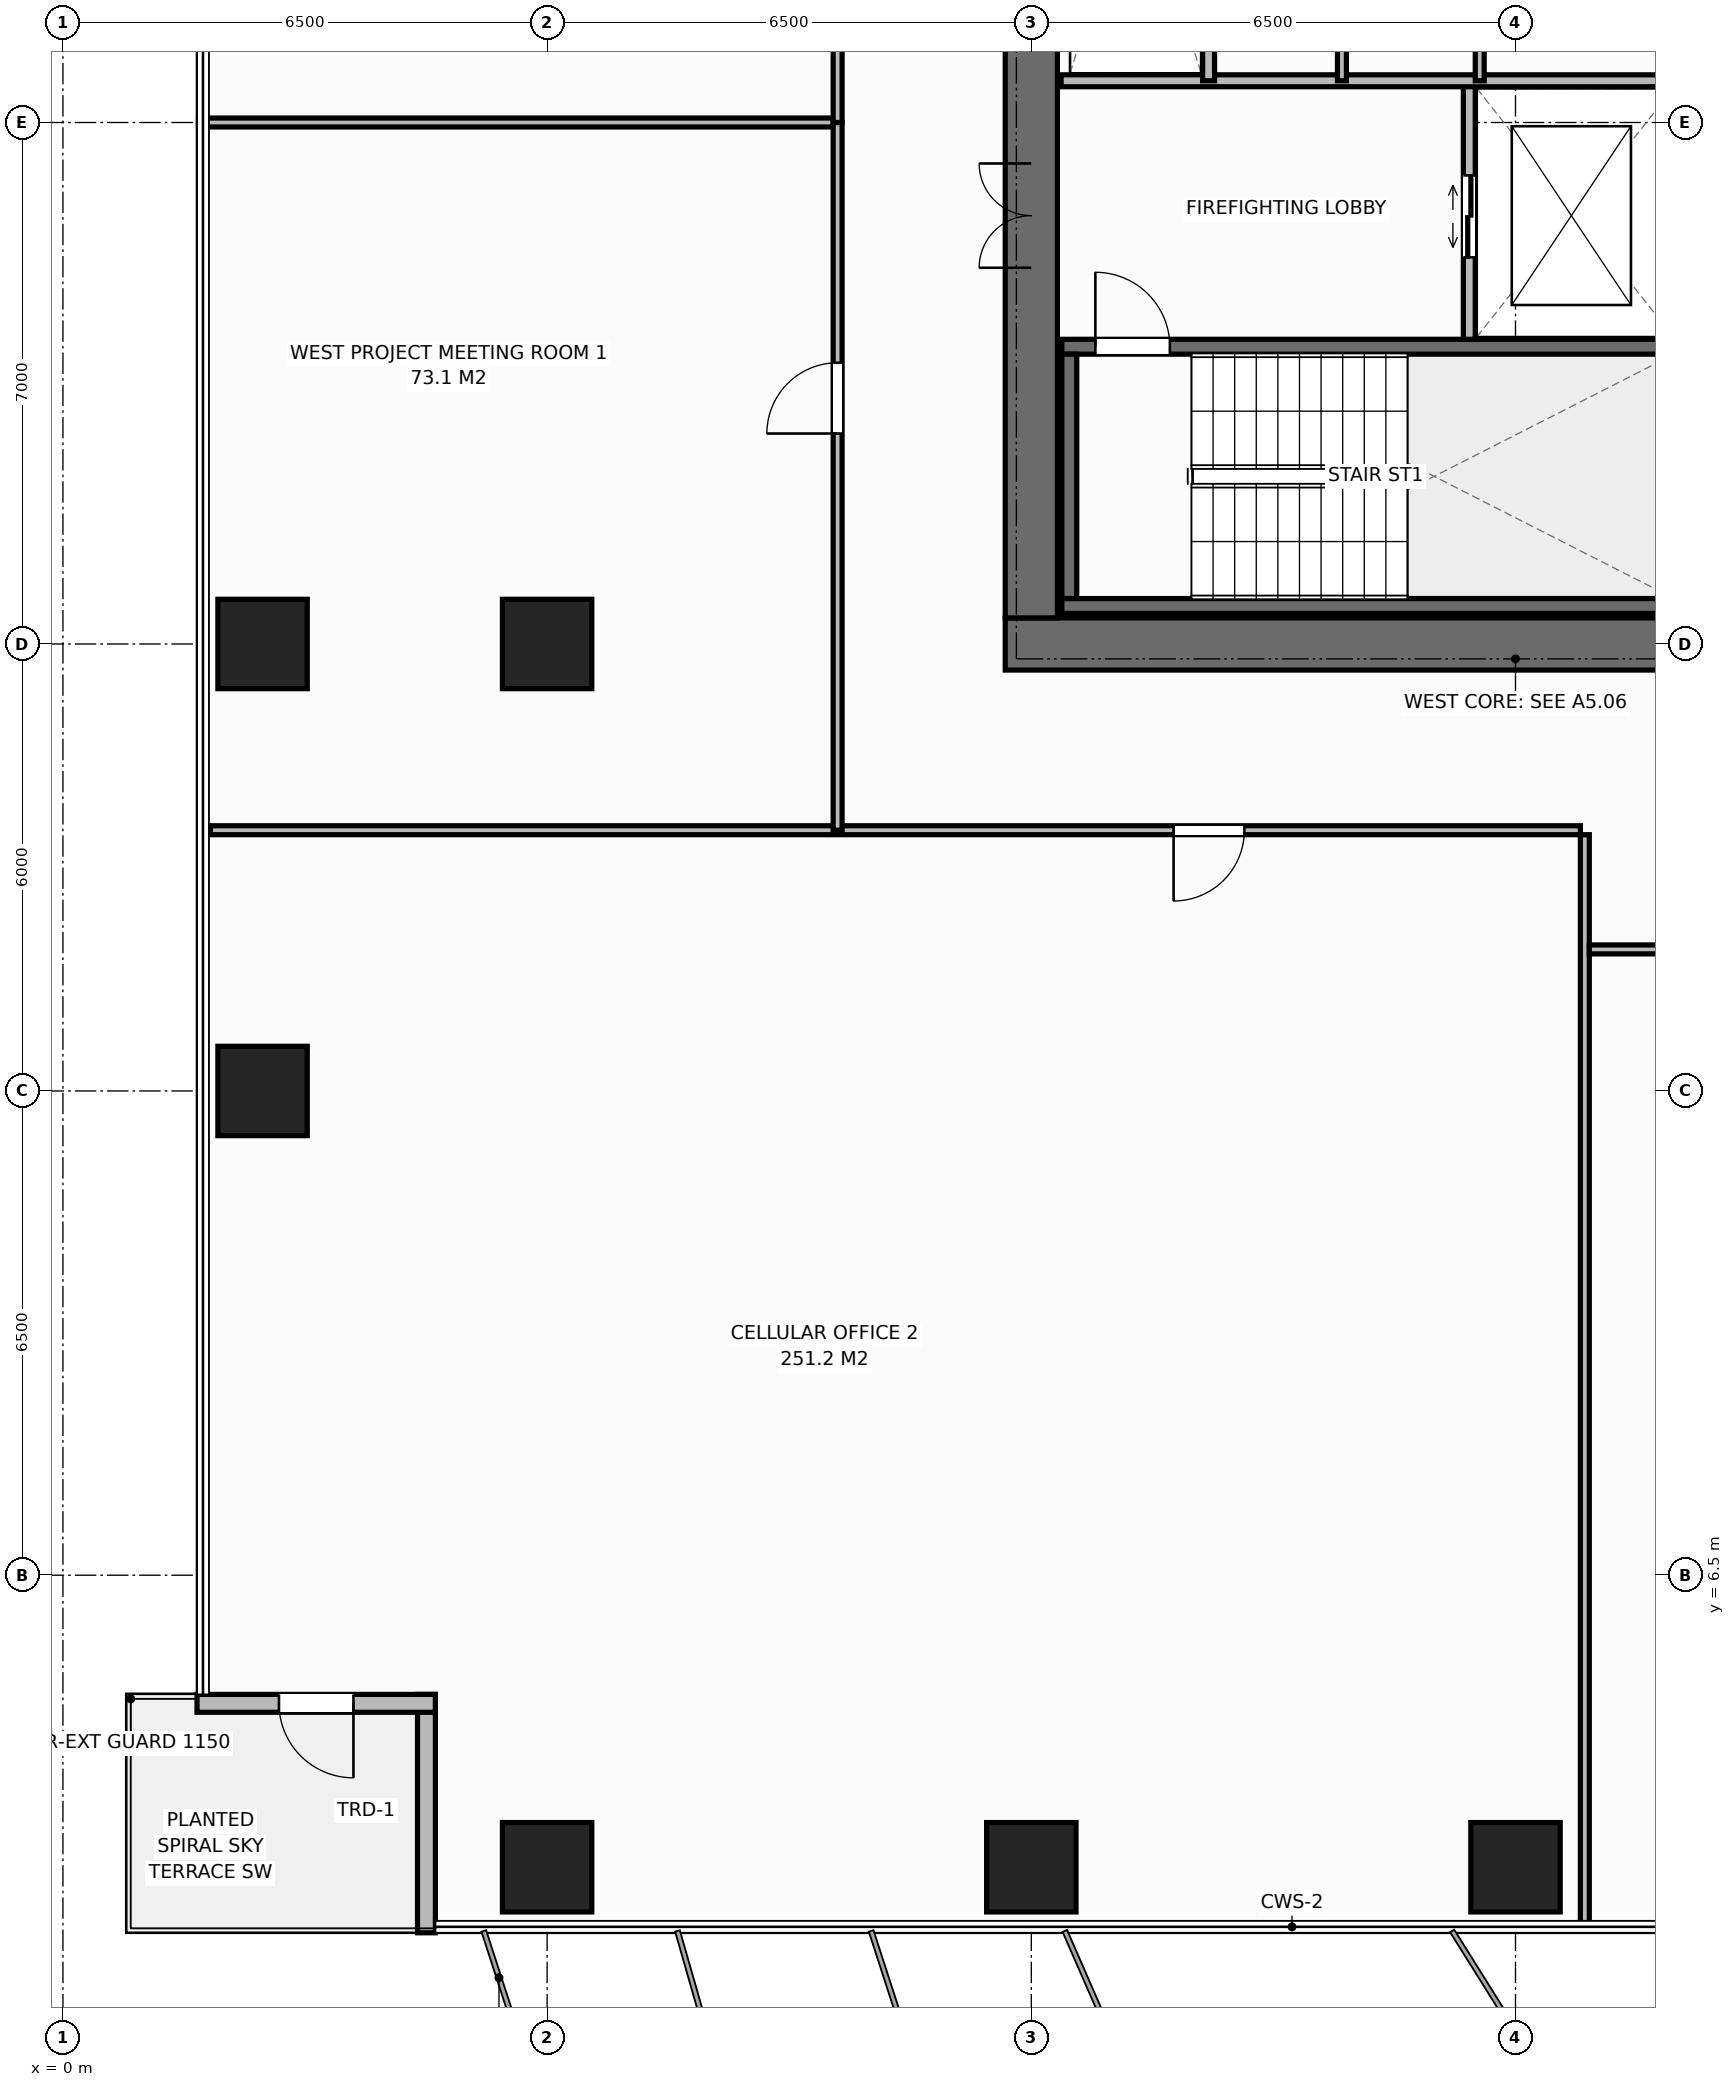
"""IFC4 building model, lengths in metres.
Left out: names, types, materials, properties, quantities, classifications, styles, units other than length and angle.
Written with IfcOpenShell. Run it as: python <this file> out.ifc"""

import sys

from ifc_helpers import new_model, si_unit, direction, frame, frame_2d, origin, origin_2d, place, context, subcontext, project, spatial, rectangle, extrude, element, fill, save


model = new_model("IFC4")
c1 = context("Model", 3, precision=1e-05, world=origin(), true_north=direction((0.0, 1.0)))
c2 = subcontext(c1, "Body", "Model", "MODEL_VIEW")
j1 = project(units=[si_unit("LENGTHUNIT", "METRE"), si_unit("PLANEANGLEUNIT", "RADIAN")], contexts=[c1])
p1 = place(None, origin())
s1 = spatial("IfcSite", under=j1, at=p1, CompositionType="ELEMENT")
p2 = place(p1, origin())
s2 = spatial("IfcBuilding", under=s1, at=p2, CompositionType="ELEMENT")
p3 = place(p2, frame((0.0, 0.0, 105.0)))
s3 = spatial("IfcBuildingStorey", under=s2, at=p3, CompositionType="ELEMENT", Elevation=105.0)
p4 = place(p3, frame((12.65, 19.0, 0.0), z_axis=(0.0, 0.0, 1.0), x_axis=(1.0, 0.0, 0.0)))
e1 = element("IfcWall", 1, at=p4, inside=s3, PredefinedType="SHEAR", context=c2, shape_type="SweptSolid", body=[
    extrude(rectangle(XDim=13.7, YDim=0.7, at=frame_2d((6.85, 0.0))), origin(), (0.0, 0.0, 1.0), 3.8),
])
p5 = place(p4, frame((9.23, 0.0, 0.0)))
e2 = element("IfcOpeningElement", 2, at=p5, cuts=e1, PredefinedType="OPENING", context=c2, shape_type="SweptSolid", body=[
    extrude(rectangle(XDim=1.4, YDim=2.2, at=frame_2d((0.7, 1.1))), frame((0.0, 0.36, 0.0), z_axis=(0.0, -1.0, 0.0), x_axis=(1.0, 0.0, 0.0)), (0.0, 0.0, 1.0), 0.72),
])
p6 = place(p3, frame((13.0, 19.35, 0.0), z_axis=(0.0, 0.0, 1.0), x_axis=(0.0, 1.0, 0.0)))
e3 = element("IfcWall", 3, at=p6, inside=s3, PredefinedType="SHEAR", context=c2, shape_type="SweptSolid", body=[
    extrude(rectangle(XDim=13.3, YDim=0.7, at=frame_2d((6.65, 0.0))), origin(), (0.0, 0.0, 1.0), 3.8),
])
p7 = place(p6, frame((4.7, 0.0, 0.0)))
e4 = element("IfcOpeningElement", 4, at=p7, cuts=e3, PredefinedType="OPENING", context=c2, shape_type="SweptSolid", body=[
    extrude(rectangle(XDim=1.4, YDim=2.2, at=frame_2d((0.7, 1.1))), frame((0.0, 0.36, 0.0), z_axis=(0.0, -1.0, 0.0), x_axis=(1.0, 0.0, 0.0)), (0.0, 0.0, 1.0), 0.72),
])
p8 = place(p3, frame((13.41, 19.51, 0.0), z_axis=(0.0, 0.0, 1.0), x_axis=(1.0, 0.0, 0.0)))
e5 = element("IfcWall", 5, at=p8, inside=s3, PredefinedType="SHEAR", context=c2, shape_type="SweptSolid", body=[
    extrude(rectangle(XDim=8.43, YDim=0.2, at=frame_2d((4.215, 0.0))), origin(), (0.0, 0.0, 1.0), 3.8),
])
p9 = place(p3, frame((13.41, 22.99, 0.0), z_axis=(0.0, 0.0, 1.0), x_axis=(1.0, 0.0, 0.0)))
e6 = element("IfcWall", 6, at=p9, inside=s3, PredefinedType="SHEAR", context=c2, shape_type="SweptSolid", body=[
    extrude(rectangle(XDim=8.43, YDim=0.2, at=frame_2d((4.215, 0.0))), origin(), (0.0, 0.0, 1.0), 3.8),
])
p10 = place(p9, frame((0.45, 0.0, 0.0)))
e7 = element("IfcOpeningElement", 7, at=p10, cuts=e6, PredefinedType="OPENING", context=c2, shape_type="SweptSolid", body=[
    extrude(rectangle(XDim=1.0, YDim=2.15, at=frame_2d((0.5, 1.075))), frame((0.0, 0.11, 0.0), z_axis=(0.0, -1.0, 0.0), x_axis=(1.0, 0.0, 0.0)), (0.0, 0.0, 1.0), 0.22),
])
p11 = place(p3, frame((13.51, 19.61, 0.0), z_axis=(0.0, 0.0, 1.0), x_axis=(0.0, 1.0, 0.0)))
e8 = element("IfcWall", 8, at=p11, inside=s3, PredefinedType="SHEAR", context=c2, shape_type="SweptSolid", body=[
    extrude(rectangle(XDim=3.28, YDim=0.2, at=frame_2d((1.64, 0.0))), origin(), (0.0, 0.0, 1.0), 3.8),
])
for number, where, z_axis, x_axis in (
    (9, (6.5, 19.0, 0.0), (0.0, 0.0, 1.0), (1.0, 0.0, 0.0)),
    (10, (6.5, 2.58, 0.0), (0.0, 0.0, 1.0), (1.0, 0.0, 0.0)),
    (11, (13.0, 2.58, 0.0), (0.0, 0.0, 1.0), (1.0, 0.0, 0.0)),
    (12, (19.5, 2.58, 0.0), (0.0, 0.0, 1.0), (1.0, 0.0, 0.0)),
    (13, (2.68, 13.0, 0.0), (0.0, 0.0, 1.0), (1.0, 0.0, 0.0)),
    (14, (2.68, 19.0, 0.0), (0.0, 0.0, 1.0), (1.0, 0.0, 0.0)),
):
    element("IfcColumn", number, at=place(p3, frame(where, z_axis=z_axis, x_axis=x_axis)), inside=s3, PredefinedType="COLUMN", context=c2, shape_type="SweptSolid", body=[
        extrude(rectangle(XDim=1.2, YDim=1.2, at=origin_2d()), origin(), (0.0, 0.0, 1.0), 3.8),
    ])
p12 = place(p3, frame((4.88, 1.7, 0.0), z_axis=(0.0, 0.0, 1.0), x_axis=(0.0, 1.0, 0.0)))
e15 = element("IfcWall", 15, at=p12, inside=s3, PredefinedType="STANDARD", context=c2, shape_type="SweptSolid", body=[
    extrude(rectangle(XDim=3.2, YDim=0.24, at=frame_2d((1.6, 0.0))), origin(), (0.0, 0.0, 1.0), 3.565),
])
p13 = place(p3, frame((5.0, 4.78, 0.0), z_axis=(0.0, 0.0, 1.0), x_axis=(-1.0, 0.0, 0.0)))
e16 = element("IfcWall", 16, at=p13, inside=s3, PredefinedType="STANDARD", context=c2, shape_type="SweptSolid", body=[
    extrude(rectangle(XDim=3.2, YDim=0.24, at=frame_2d((1.6, 0.0))), origin(), (0.0, 0.0, 1.0), 3.565),
])
p14 = place(p13, frame((1.1, 0.0, 0.0)))
e17 = element("IfcOpeningElement", 17, at=p14, cuts=e16, PredefinedType="OPENING", context=c2, shape_type="SweptSolid", body=[
    extrude(rectangle(XDim=1.0, YDim=2.2, at=frame_2d((0.5, 1.1))), frame((0.0, 0.13, 0.0), z_axis=(0.0, -1.0, 0.0), x_axis=(1.0, 0.0, 0.0)), (0.0, 0.0, 1.0), 0.26),
])
p15 = place(p3, frame((18.88, 23.09, 0.0), z_axis=(0.0, 0.0, 1.0), x_axis=(0.0, 1.0, 0.0)))
e18 = element("IfcWall", 18, at=p15, inside=s3, PredefinedType="STANDARD", context=c2, shape_type="SweptSolid", body=[
    extrude(rectangle(XDim=3.47, YDim=0.16, at=frame_2d((1.735, 0.0))), origin(), (0.0, 0.0, 1.0), 3.565),
])
p16 = place(p15, frame((1.1, 0.0, 0.0)))
e19 = element("IfcOpeningElement", 19, at=p16, cuts=e18, PredefinedType="OPENING", context=c2, shape_type="SweptSolid", body=[
    extrude(rectangle(XDim=1.1, YDim=2.2, at=frame_2d((0.55, 1.1))), frame((0.0, 0.09, 0.0), z_axis=(0.0, -1.0, 0.0), x_axis=(1.0, 0.0, 0.0)), (0.0, 0.0, 1.0), 0.18),
])
p17 = place(p3, frame((13.4, 26.56, 0.0), z_axis=(0.0, 0.0, 1.0), x_axis=(1.0, 0.0, 0.0)))
e20 = element("IfcWall", 20, at=p17, inside=s3, PredefinedType="STANDARD", context=c2, shape_type="SweptSolid", body=[
    extrude(rectangle(XDim=8.34, YDim=0.16, at=frame_2d((4.17, 0.0))), origin(), (0.0, 0.0, 1.0), 3.565),
])
p18 = place(p3, frame((15.38, 26.56, 0.0), z_axis=(0.0, 0.0, 1.0), x_axis=(0.0, 1.0, 0.0)))
e21 = element("IfcWall", 21, at=p18, inside=s3, PredefinedType="STANDARD", context=c2, shape_type="SweptSolid", body=[
    extrude(rectangle(XDim=6.09, YDim=0.16, at=frame_2d((3.045, 0.0))), origin(), (0.0, 0.0, 1.0), 3.565),
])
for number, where, z_axis, x_axis in (
    (22, (17.17, 26.56, 0.0), (0.0, 0.0, 1.0), (0.0, 1.0, 0.0)),
    (23, (19.02, 26.56, 0.0), (0.0, 0.0, 1.0), (0.0, 1.0, 0.0)),
):
    element("IfcWall", number, at=place(p3, frame(where, z_axis=z_axis, x_axis=x_axis)), inside=s3, PredefinedType="PARTITIONING", context=c2, shape_type="SweptSolid", body=[
        extrude(rectangle(XDim=6.09, YDim=0.12, at=frame_2d((3.045, 0.0))), origin(), (0.0, 0.0, 1.0), 3.565),
    ])
p19 = place(p3, frame((20.431, 1.72, 0.0), z_axis=(0.0, 0.0, 1.0), x_axis=(0.0, 1.0, 0.0)))
e24 = element("IfcWall", 24, at=p19, inside=s3, PredefinedType="PARTITIONING", context=c2, shape_type="SweptSolid", body=[
    extrude(rectangle(XDim=14.72, YDim=0.12, at=frame_2d((7.36, 0.0))), origin(), (0.0, 0.0, 1.0), 3.565),
])
p20 = place(p3, frame((1.98, 16.5, 0.0), z_axis=(0.0, 0.0, 1.0), x_axis=(1.0, 0.0, 0.0)))
e25 = element("IfcWall", 25, at=p20, inside=s3, PredefinedType="PARTITIONING", context=c2, shape_type="SweptSolid", body=[
    extrude(rectangle(XDim=18.391, YDim=0.12, at=frame_2d((9.195, 0.0))), origin(), (0.0, 0.0, 1.0), 3.565),
])
p21 = place(p20, frame((12.93, 0.0, 0.0)))
e26 = element("IfcOpeningElement", 26, at=p21, cuts=e25, PredefinedType="OPENING", context=c2, shape_type="SweptSolid", body=[
    extrude(rectangle(XDim=0.95, YDim=2.15, at=frame_2d((0.475, 1.075))), frame((0.0, 0.07, 0.0), z_axis=(0.0, -1.0, 0.0), x_axis=(1.0, 0.0, 0.0)), (0.0, 0.0, 1.0), 0.14),
])
p22 = place(p3, frame((20.491, 14.9, 0.0), z_axis=(0.0, 0.0, 1.0), x_axis=(1.0, 0.0, 0.0)))
e27 = element("IfcWall", 27, at=p22, inside=s3, PredefinedType="PARTITIONING", context=c2, shape_type="SweptSolid", body=[
    extrude(rectangle(XDim=13.977, YDim=0.12, at=frame_2d((6.989, 0.0))), origin(), (0.0, 0.0, 1.0), 3.565),
])
p23 = place(p22, frame((6.514, 0.0, 0.0)))
e28 = element("IfcOpeningElement", 28, at=p23, cuts=e27, PredefinedType="OPENING", context=c2, shape_type="SweptSolid", body=[
    extrude(rectangle(XDim=0.95, YDim=2.15, at=frame_2d((0.475, 1.075))), frame((0.0, 0.07, 0.0), z_axis=(0.0, -1.0, 0.0), x_axis=(1.0, 0.0, 0.0)), (0.0, 0.0, 1.0), 0.14),
])
p24 = place(p3, frame((1.82, 26.0, 0.0), z_axis=(0.0, 0.0, 1.0), x_axis=(1.0, 0.0, 0.0)))
e29 = element("IfcWall", 29, at=p24, inside=s3, PredefinedType="PARTITIONING", context=c2, shape_type="SweptSolid", body=[
    extrude(rectangle(XDim=8.58, YDim=0.12, at=frame_2d((4.29, 0.0))), origin(), (0.0, 0.0, 1.0), 3.565),
])
p25 = place(p3, frame((10.4, 16.5, 0.0), z_axis=(0.0, 0.0, 1.0), x_axis=(0.0, 1.0, 0.0)))
e30 = element("IfcWall", 30, at=p25, inside=s3, PredefinedType="PARTITIONING", context=c2, shape_type="SweptSolid", body=[
    extrude(rectangle(XDim=9.5, YDim=0.12, at=frame_2d((4.75, 0.0))), origin(), (0.0, 0.0, 1.0), 3.565),
])
p26 = place(p25, frame((5.325, 0.0, 0.0)))
e31 = element("IfcOpeningElement", 31, at=p26, cuts=e30, PredefinedType="OPENING", context=c2, shape_type="SweptSolid", body=[
    extrude(rectangle(XDim=0.95, YDim=2.15, at=frame_2d((0.475, 1.075))), frame((0.0, 0.07, 0.0), z_axis=(0.0, -1.0, 0.0), x_axis=(1.0, 0.0, 0.0)), (0.0, 0.0, 1.0), 0.14),
])
p27 = place(p3, frame((10.4, 26.0, 0.0), z_axis=(0.0, 0.0, 1.0), x_axis=(0.0, 1.0, 0.0)))
e32 = element("IfcWall", 32, at=p27, inside=s3, PredefinedType="PARTITIONING", context=c2, shape_type="SweptSolid", body=[
    extrude(rectangle(XDim=9.5, YDim=0.12, at=frame_2d((4.75, 0.0))), origin(), (0.0, 0.0, 1.0), 3.565),
])
p28 = place(p27, frame((3.225, 0.0, 0.0)))
e33 = element("IfcOpeningElement", 33, at=p28, cuts=e32, PredefinedType="OPENING", context=c2, shape_type="SweptSolid", body=[
    extrude(rectangle(XDim=0.95, YDim=2.15, at=frame_2d((0.475, 1.075))), frame((0.0, 0.07, 0.0), z_axis=(0.0, -1.0, 0.0), x_axis=(1.0, 0.0, 0.0)), (0.0, 0.0, 1.0), 0.14),
])
p29 = place(p14, origin())
e34 = element("IfcDoor", 34, at=p29, inside=s3, OperationType="SINGLE_SWING_LEFT", PredefinedType="DOOR", context=c2, shape_type="SweptSolid", body=[
    extrude(rectangle(XDim=1.0, YDim=2.2, at=frame_2d((0.5, 1.1))), frame((0.0, 0.025, 0.0), z_axis=(0.0, -1.0, 0.0), x_axis=(1.0, 0.0, 0.0)), (0.0, 0.0, 1.0), 0.05),
])
fill(e17, e34)
p30 = place(p10, origin())
e35 = element("IfcDoor", 35, at=p30, inside=s3, OperationType="SINGLE_SWING_LEFT", PredefinedType="DOOR", context=c2, shape_type="SweptSolid", body=[
    extrude(rectangle(XDim=1.0, YDim=2.15, at=frame_2d((0.5, 1.075))), frame((0.0, 0.025, 0.0), z_axis=(0.0, -1.0, 0.0), x_axis=(1.0, 0.0, 0.0)), (0.0, 0.0, 1.0), 0.05),
])
fill(e7, e35)
p31 = place(p7, origin())
e36 = element("IfcDoor", 36, at=p31, inside=s3, OperationType="DOUBLE_DOOR_SINGLE_SWING", PredefinedType="DOOR", context=c2, shape_type="SweptSolid", body=[
    extrude(rectangle(XDim=1.4, YDim=2.2, at=frame_2d((0.7, 1.1))), frame((0.0, 0.025, 0.0), z_axis=(0.0, -1.0, 0.0), x_axis=(1.0, 0.0, 0.0)), (0.0, 0.0, 1.0), 0.05),
])
fill(e4, e36)
p32 = place(p16, origin())
e37 = element("IfcDoor", 37, at=p32, inside=s3, OperationType="DOUBLE_DOOR_SLIDING", PredefinedType="DOOR", context=c2, shape_type="SweptSolid", body=[
    extrude(rectangle(XDim=1.1, YDim=2.2, at=frame_2d((0.55, 1.1))), frame((0.0, 0.025, 0.0), z_axis=(0.0, -1.0, 0.0), x_axis=(1.0, 0.0, 0.0)), (0.0, 0.0, 1.0), 0.05),
])
fill(e19, e37)
p33 = place(p21, origin())
e38 = element("IfcDoor", 38, at=p33, inside=s3, OperationType="SINGLE_SWING_RIGHT", PredefinedType="DOOR", context=c2, shape_type="SweptSolid", body=[
    extrude(rectangle(XDim=0.95, YDim=2.15, at=frame_2d((0.475, 1.075))), frame((0.0, 0.025, 0.0), z_axis=(0.0, -1.0, 0.0), x_axis=(1.0, 0.0, 0.0)), (0.0, 0.0, 1.0), 0.05),
])
fill(e26, e38)
p34 = place(p26, origin())
e39 = element("IfcDoor", 39, at=p34, inside=s3, OperationType="SINGLE_SWING_LEFT", PredefinedType="DOOR", context=c2, shape_type="SweptSolid", body=[
    extrude(rectangle(XDim=0.95, YDim=2.15, at=frame_2d((0.475, 1.075))), frame((0.0, 0.025, 0.0), z_axis=(0.0, -1.0, 0.0), x_axis=(1.0, 0.0, 0.0)), (0.0, 0.0, 1.0), 0.05),
])
fill(e31, e39)
save(model, sys.argv[1])
